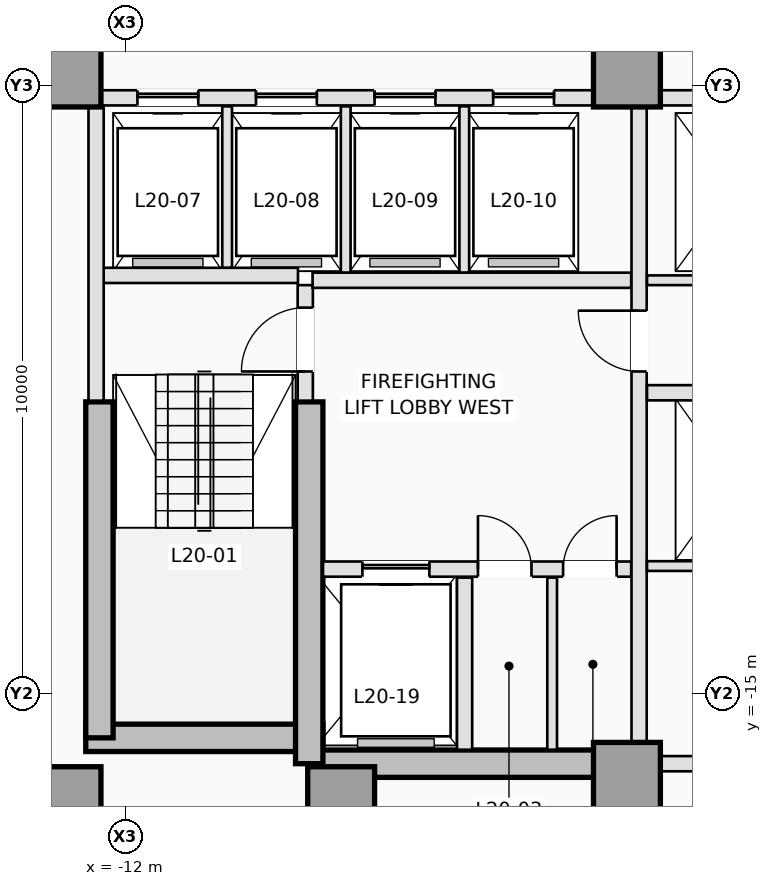
"""IFC4 building model, lengths in metres.
Left out: names, types, materials, properties, quantities, classifications, styles, units other than length and angle.
Written with IfcOpenShell. Run it as: python <this file> out.ifc"""

import sys

from ifc_helpers import new_model, si_unit, direction, frame, frame_2d, origin, origin_2d, place, context, subcontext, project, spatial, rectangle, extrude, element, fill, save


model = new_model("IFC4")
c1 = context("Model", 3, precision=1e-05, world=origin(), true_north=direction((0.0, 1.0)))
c2 = subcontext(c1, "Body", "Model", "MODEL_VIEW")
j1 = project(units=[si_unit("LENGTHUNIT", "METRE"), si_unit("PLANEANGLEUNIT", "RADIAN")], contexts=[c1])
p1 = place(None, origin())
s1 = spatial("IfcSite", under=j1, at=p1, CompositionType="ELEMENT")
p2 = place(p1, origin())
s2 = spatial("IfcBuilding", under=s1, at=p2, CompositionType="ELEMENT")
p3 = place(p2, frame((0.0, 0.0, 76.6)))
s3 = spatial("IfcBuildingStorey", under=s2, at=p3, CompositionType="ELEMENT", Elevation=76.6)
p4 = place(p3, frame((-12.65, -15.725, 0.0), z_axis=(0.0, 0.0, 1.0), x_axis=(1.0, 0.0, 0.0)))
e1 = element("IfcWall", 1, at=p4, inside=s3, PredefinedType="SHEAR", context=c2, shape_type="SweptSolid", body=[
    extrude(rectangle(XDim=3.9, YDim=0.45, at=frame_2d((1.95, 0.0))), origin(), (0.0, 0.0, 1.0), 3.5),
])
p5 = place(p3, frame((-8.975, -16.15, 0.0), z_axis=(0.0, 0.0, 1.0), x_axis=(1.0, 0.0, 0.0)))
e2 = element("IfcWall", 2, at=p5, inside=s3, PredefinedType="SHEAR", context=c2, shape_type="SweptSolid", body=[
    extrude(rectangle(XDim=5.225, YDim=0.45, at=frame_2d((2.613, 0.0))), origin(), (0.0, 0.0, 1.0), 3.5),
])
p6 = place(p3, frame((-12.425, -15.725, 0.0), z_axis=(0.0, 0.0, 1.0), x_axis=(0.0, 1.0, 0.0)))
e3 = element("IfcWall", 3, at=p6, inside=s3, PredefinedType="SHEAR", context=c2, shape_type="SweptSolid", body=[
    extrude(rectangle(XDim=5.525, YDim=0.45, at=frame_2d((2.763, 0.0))), origin(), (0.0, 0.0, 1.0), 3.5),
])
p7 = place(p3, frame((-8.975, -16.15, 0.0), z_axis=(0.0, 0.0, 1.0), x_axis=(0.0, 1.0, 0.0)))
e4 = element("IfcWall", 4, at=p7, inside=s3, PredefinedType="SHEAR", context=c2, shape_type="SweptSolid", body=[
    extrude(rectangle(XDim=5.95, YDim=0.45, at=frame_2d((2.975, 0.0))), origin(), (0.0, 0.0, 1.0), 3.5),
])
for number, where, z_axis, x_axis in (
    (5, (-12.95, -16.75, 0.0), (0.0, 0.0, 1.0), (1.0, 0.0, 0.0)),
    (6, (-8.45, -16.75, 0.0), (0.0, 0.0, 1.0), (1.0, 0.0, 0.0)),
    (7, (-3.75, -16.35, 0.0), (0.0, 0.0, 1.0), (1.0, 0.0, 0.0)),
    (8, (-12.95, -4.8, 0.0), (0.0, 0.0, 1.0), (1.0, 0.0, 0.0)),
    (9, (-3.75, -4.8, 0.0), (0.0, 0.0, 1.0), (1.0, 0.0, 0.0)),
):
    element("IfcColumn", number, at=place(p3, frame(where, z_axis=z_axis, x_axis=x_axis)), inside=s3, PredefinedType="COLUMN", context=c2, shape_type="SweptSolid", body=[
        extrude(rectangle(XDim=1.1, YDim=1.1, at=origin_2d()), origin(), (0.0, 0.0, 1.0), 3.5),
    ])
p8 = place(p3, frame((-9.04, -10.18, 0.0), z_axis=(0.0, 0.0, 1.0), x_axis=(0.0, 1.0, 0.0)))
e10 = element("IfcWall", 10, at=p8, inside=s3, PredefinedType="PARTITIONING", context=c2, shape_type="SweptSolid", body=[
    extrude(rectangle(XDim=1.9, YDim=0.25, at=frame_2d((0.95, 0.0))), origin(), (0.0, 0.0, 1.0), 3.25),
])
p9 = place(p8, frame((0.48, 0.0, 0.0)))
e11 = element("IfcOpeningElement", 11, at=p9, cuts=e10, PredefinedType="OPENING", context=c2, shape_type="SweptSolid", body=[
    extrude(rectangle(XDim=1.05, YDim=2.15, at=frame_2d((0.525, 1.075))), frame((0.0, 0.135, 0.0), z_axis=(0.0, -1.0, 0.0), x_axis=(1.0, 0.0, 0.0)), (0.0, 0.0, 1.0), 0.27),
])
p10 = place(p3, frame((-12.38, -8.12, 0.0), z_axis=(0.0, 0.0, 1.0), x_axis=(1.0, 0.0, 0.0)))
e12 = element("IfcWall", 12, at=p10, inside=s3, PredefinedType="PARTITIONING", context=c2, shape_type="SweptSolid", body=[
    extrude(rectangle(XDim=3.22, YDim=0.25, at=frame_2d((1.61, 0.0))), origin(), (0.0, 0.0, 1.0), 3.25),
])
p11 = place(p3, frame((-12.48, -10.18, 0.0), z_axis=(0.0, 0.0, 1.0), x_axis=(0.0, 1.0, 0.0)))
e13 = element("IfcWall", 13, at=p11, inside=s3, PredefinedType="PARTITIONING", context=c2, shape_type="SweptSolid", body=[
    extrude(rectangle(XDim=4.828, YDim=0.25, at=frame_2d((2.414, 0.0))), origin(), (0.0, 0.0, 1.0), 3.25),
])
p12 = place(p3, frame((-8.748, -12.95, 0.0), z_axis=(0.0, 0.0, 1.0), x_axis=(1.0, 0.0, 0.0)))
e14 = element("IfcWall", 14, at=p12, inside=s3, PredefinedType="PARTITIONING", context=c2, shape_type="SweptSolid", body=[
    extrude(rectangle(XDim=5.068, YDim=0.25, at=frame_2d((2.534, 0.0))), origin(), (0.0, 0.0, 1.0), 3.25),
])
p13 = place(p12, frame((0.648, 0.0, 0.0)))
e15 = element("IfcOpeningElement", 15, at=p13, cuts=e14, PredefinedType="OPENING", context=c2, shape_type="SweptSolid", body=[
    extrude(rectangle(XDim=1.1, YDim=2.15, at=frame_2d((0.55, 1.075))), frame((0.0, 0.135, 0.0), z_axis=(0.0, -1.0, 0.0), x_axis=(1.0, 0.0, 0.0)), (0.0, 0.0, 1.0), 0.27),
])
p14 = place(p12, frame((2.548, 0.0, 0.0)))
e16 = element("IfcOpeningElement", 16, at=p14, cuts=e14, PredefinedType="OPENING", context=c2, shape_type="SweptSolid", body=[
    extrude(rectangle(XDim=0.88, YDim=2.1, at=frame_2d((0.44, 1.05))), frame((0.0, 0.135, 0.0), z_axis=(0.0, -1.0, 0.0), x_axis=(1.0, 0.0, 0.0)), (0.0, 0.0, 1.0), 0.27),
])
p15 = place(p12, frame((3.948, 0.0, 0.0)))
e17 = element("IfcOpeningElement", 17, at=p15, cuts=e14, PredefinedType="OPENING", context=c2, shape_type="SweptSolid", body=[
    extrude(rectangle(XDim=0.88, YDim=2.1, at=frame_2d((0.44, 1.05))), frame((0.0, 0.135, 0.0), z_axis=(0.0, -1.0, 0.0), x_axis=(1.0, 0.0, 0.0)), (0.0, 0.0, 1.0), 0.27),
])
p16 = place(p3, frame((-6.42, -15.92, 0.0), z_axis=(0.0, 0.0, 1.0), x_axis=(0.0, 1.0, 0.0)))
e18 = element("IfcWall", 18, at=p16, inside=s3, PredefinedType="PARTITIONING", context=c2, shape_type="SweptSolid", body=[
    extrude(rectangle(XDim=2.83, YDim=0.25, at=frame_2d((1.415, 0.0))), origin(), (0.0, 0.0, 1.0), 3.25),
])
p17 = place(p3, frame((-4.98, -15.92, 0.0), z_axis=(0.0, 0.0, 1.0), x_axis=(0.0, 1.0, 0.0)))
e19 = element("IfcWall", 19, at=p17, inside=s3, PredefinedType="PARTITIONING", context=c2, shape_type="SweptSolid", body=[
    extrude(rectangle(XDim=2.83, YDim=0.16, at=frame_2d((1.415, 0.0))), origin(), (0.0, 0.0, 1.0), 3.25),
])
p18 = place(p3, frame((-8.92, -8.2, 0.0), z_axis=(0.0, 0.0, 1.0), x_axis=(1.0, 0.0, 0.0)))
e20 = element("IfcWall", 20, at=p18, inside=s3, PredefinedType="PARTITIONING", context=c2, shape_type="SweptSolid", body=[
    extrude(rectangle(XDim=5.24, YDim=0.25, at=frame_2d((2.62, 0.0))), origin(), (0.0, 0.0, 1.0), 3.25),
])
p19 = place(p3, frame((-3.55, -15.798, 0.0), z_axis=(0.0, 0.0, 1.0), x_axis=(0.0, 1.0, 0.0)))
e21 = element("IfcWall", 21, at=p19, inside=s3, PredefinedType="PARTITIONING", context=c2, shape_type="SweptSolid", body=[
    extrude(rectangle(XDim=10.446, YDim=0.25, at=frame_2d((5.223, 0.0))), origin(), (0.0, 0.0, 1.0), 3.25),
])
p20 = place(p19, frame((6.098, 0.0, 0.0)))
e22 = element("IfcOpeningElement", 22, at=p20, cuts=e21, PredefinedType="OPENING", context=c2, shape_type="SweptSolid", body=[
    extrude(rectangle(XDim=1.0, YDim=2.15, at=frame_2d((0.5, 1.075))), frame((0.0, 0.135, 0.0), z_axis=(0.0, -1.0, 0.0), x_axis=(1.0, 0.0, 0.0)), (0.0, 0.0, 1.0), 0.27),
])
p21 = place(p3, frame((-12.398, -5.2, 0.0), z_axis=(0.0, 0.0, 1.0), x_axis=(1.0, 0.0, 0.0)))
e23 = element("IfcWall", 23, at=p21, inside=s3, PredefinedType="PARTITIONING", context=c2, shape_type="SweptSolid", body=[
    extrude(rectangle(XDim=8.096, YDim=0.25, at=frame_2d((4.048, 0.0))), origin(), (0.0, 0.0, 1.0), 3.25),
])
p22 = place(p21, frame((0.598, 0.0, 0.0)))
e24 = element("IfcOpeningElement", 24, at=p22, cuts=e23, PredefinedType="OPENING", context=c2, shape_type="SweptSolid", body=[
    extrude(rectangle(XDim=1.0, YDim=2.15, at=frame_2d((0.5, 1.075))), frame((0.0, 0.135, 0.0), z_axis=(0.0, -1.0, 0.0), x_axis=(1.0, 0.0, 0.0)), (0.0, 0.0, 1.0), 0.27),
])
p23 = place(p21, frame((2.548, 0.0, 0.0)))
e25 = element("IfcOpeningElement", 25, at=p23, cuts=e23, PredefinedType="OPENING", context=c2, shape_type="SweptSolid", body=[
    extrude(rectangle(XDim=1.0, YDim=2.15, at=frame_2d((0.5, 1.075))), frame((0.0, 0.135, 0.0), z_axis=(0.0, -1.0, 0.0), x_axis=(1.0, 0.0, 0.0)), (0.0, 0.0, 1.0), 0.27),
])
p24 = place(p21, frame((4.498, 0.0, 0.0)))
e26 = element("IfcOpeningElement", 26, at=p24, cuts=e23, PredefinedType="OPENING", context=c2, shape_type="SweptSolid", body=[
    extrude(rectangle(XDim=1.0, YDim=2.15, at=frame_2d((0.5, 1.075))), frame((0.0, 0.135, 0.0), z_axis=(0.0, -1.0, 0.0), x_axis=(1.0, 0.0, 0.0)), (0.0, 0.0, 1.0), 0.27),
])
p25 = place(p21, frame((6.448, 0.0, 0.0)))
e27 = element("IfcOpeningElement", 27, at=p25, cuts=e23, PredefinedType="OPENING", context=c2, shape_type="SweptSolid", body=[
    extrude(rectangle(XDim=1.0, YDim=2.15, at=frame_2d((0.5, 1.075))), frame((0.0, 0.135, 0.0), z_axis=(0.0, -1.0, 0.0), x_axis=(1.0, 0.0, 0.0)), (0.0, 0.0, 1.0), 0.27),
])
p26 = place(p3, frame((-3.198, -5.2, 0.0), z_axis=(0.0, 0.0, 1.0), x_axis=(1.0, 0.0, 0.0)))
e28 = element("IfcWall", 28, at=p26, inside=s3, PredefinedType="PARTITIONING", context=c2, shape_type="SweptSolid", body=[
    extrude(rectangle(XDim=2.248, YDim=0.25, at=frame_2d((1.124, 0.0))), origin(), (0.0, 0.0, 1.0), 3.25),
])
p27 = place(p3, frame((-10.325, -7.993, 0.0), z_axis=(0.0, 0.0, 1.0), x_axis=(0.0, 1.0, 0.0)))
e29 = element("IfcWall", 29, at=p27, inside=s3, PredefinedType="PARTITIONING", context=c2, shape_type="SweptSolid", body=[
    extrude(rectangle(XDim=2.653, YDim=0.16, at=frame_2d((1.326, 0.0))), origin(), (0.0, 0.0, 1.0), 3.25),
])
for number, where, z_axis, x_axis in (
    (30, (-8.375, -8.073, 0.0), (0.0, 0.0, 1.0), (0.0, 1.0, 0.0)),
    (31, (-6.425, -8.073, 0.0), (0.0, 0.0, 1.0), (0.0, 1.0, 0.0)),
):
    element("IfcWall", number, at=place(p3, frame(where, z_axis=z_axis, x_axis=x_axis)), inside=s3, PredefinedType="PARTITIONING", context=c2, shape_type="SweptSolid", body=[
        extrude(rectangle(XDim=2.733, YDim=0.16, at=frame_2d((1.366, 0.0))), origin(), (0.0, 0.0, 1.0), 3.25),
    ])
p28 = place(p3, frame((-3.198, -16.15, 0.0), z_axis=(0.0, 0.0, 1.0), x_axis=(1.0, 0.0, 0.0)))
e32 = element("IfcWall", 32, at=p28, inside=s3, PredefinedType="PARTITIONING", context=c2, shape_type="SweptSolid", body=[
    extrude(rectangle(XDim=6.396, YDim=0.25, at=frame_2d((3.198, 0.0))), origin(), (0.0, 0.0, 1.0), 2.3),
])
p29 = place(p3, frame((-3.42, -8.2, 0.0), z_axis=(0.0, 0.0, 1.0), x_axis=(1.0, 0.0, 0.0)))
e33 = element("IfcWall", 33, at=p29, inside=s3, PredefinedType="PARTITIONING", context=c2, shape_type="SweptSolid", body=[
    extrude(rectangle(XDim=2.47, YDim=0.16, at=frame_2d((1.235, 0.0))), origin(), (0.0, 0.0, 1.0), 3.25),
])
p30 = place(p3, frame((-3.42, -10.05, 0.0), z_axis=(0.0, 0.0, 1.0), x_axis=(1.0, 0.0, 0.0)))
e34 = element("IfcWall", 34, at=p30, inside=s3, PredefinedType="PARTITIONING", context=c2, shape_type="SweptSolid", body=[
    extrude(rectangle(XDim=2.47, YDim=0.25, at=frame_2d((1.235, 0.0))), origin(), (0.0, 0.0, 1.0), 3.25),
])
p31 = place(p3, frame((-3.42, -12.9, 0.0), z_axis=(0.0, 0.0, 1.0), x_axis=(1.0, 0.0, 0.0)))
e35 = element("IfcWall", 35, at=p31, inside=s3, PredefinedType="PARTITIONING", context=c2, shape_type="SweptSolid", body=[
    extrude(rectangle(XDim=6.84, YDim=0.16, at=frame_2d((3.42, 0.0))), origin(), (0.0, 0.0, 1.0), 3.25),
])
p32 = place(p31, frame((2.98, 0.0, 0.0)))
e36 = element("IfcOpeningElement", 36, at=p32, cuts=e35, PredefinedType="OPENING", context=c2, shape_type="SweptSolid", body=[
    extrude(rectangle(XDim=0.88, YDim=2.12, at=frame_2d((0.44, 1.06))), frame((0.0, 0.09, 0.0), z_axis=(0.0, -1.0, 0.0), x_axis=(1.0, 0.0, 0.0)), (0.0, 0.0, 1.0), 0.18),
])
p33 = place(p22, origin())
e37 = element("IfcDoor", 37, at=p33, inside=s3, OperationType="SLIDING_TO_LEFT", PredefinedType="DOOR", context=c2, shape_type="SweptSolid", body=[
    extrude(rectangle(XDim=1.0, YDim=2.15, at=frame_2d((0.5, 1.075))), frame((0.0, 0.025, 0.0), z_axis=(0.0, -1.0, 0.0), x_axis=(1.0, 0.0, 0.0)), (0.0, 0.0, 1.0), 0.05),
])
fill(e24, e37)
p34 = place(p23, origin())
e38 = element("IfcDoor", 38, at=p34, inside=s3, OperationType="SLIDING_TO_LEFT", PredefinedType="DOOR", context=c2, shape_type="SweptSolid", body=[
    extrude(rectangle(XDim=1.0, YDim=2.15, at=frame_2d((0.5, 1.075))), frame((0.0, 0.025, 0.0), z_axis=(0.0, -1.0, 0.0), x_axis=(1.0, 0.0, 0.0)), (0.0, 0.0, 1.0), 0.05),
])
fill(e25, e38)
p35 = place(p24, origin())
e39 = element("IfcDoor", 39, at=p35, inside=s3, OperationType="SLIDING_TO_LEFT", PredefinedType="DOOR", context=c2, shape_type="SweptSolid", body=[
    extrude(rectangle(XDim=1.0, YDim=2.15, at=frame_2d((0.5, 1.075))), frame((0.0, 0.025, 0.0), z_axis=(0.0, -1.0, 0.0), x_axis=(1.0, 0.0, 0.0)), (0.0, 0.0, 1.0), 0.05),
])
fill(e26, e39)
p36 = place(p25, origin())
e40 = element("IfcDoor", 40, at=p36, inside=s3, OperationType="SLIDING_TO_LEFT", PredefinedType="DOOR", context=c2, shape_type="SweptSolid", body=[
    extrude(rectangle(XDim=1.0, YDim=2.15, at=frame_2d((0.5, 1.075))), frame((0.0, 0.025, 0.0), z_axis=(0.0, -1.0, 0.0), x_axis=(1.0, 0.0, 0.0)), (0.0, 0.0, 1.0), 0.05),
])
fill(e27, e40)
p37 = place(p13, origin())
e41 = element("IfcDoor", 41, at=p37, inside=s3, OperationType="SLIDING_TO_LEFT", PredefinedType="DOOR", context=c2, shape_type="SweptSolid", body=[
    extrude(rectangle(XDim=1.1, YDim=2.15, at=frame_2d((0.55, 1.075))), frame((0.0, 0.025, 0.0), z_axis=(0.0, -1.0, 0.0), x_axis=(1.0, 0.0, 0.0)), (0.0, 0.0, 1.0), 0.05),
])
fill(e15, e41)
p38 = place(p9, origin())
e42 = element("IfcDoor", 42, at=p38, inside=s3, OperationType="SINGLE_SWING_LEFT", PredefinedType="DOOR", context=c2, shape_type="SweptSolid", body=[
    extrude(rectangle(XDim=1.05, YDim=2.15, at=frame_2d((0.525, 1.075))), frame((0.0, 0.025, 0.0), z_axis=(0.0, -1.0, 0.0), x_axis=(1.0, 0.0, 0.0)), (0.0, 0.0, 1.0), 0.05),
])
fill(e11, e42)
p39 = place(p14, origin())
e43 = element("IfcDoor", 43, at=p39, inside=s3, OperationType="SINGLE_SWING_LEFT", PredefinedType="TRAPDOOR", context=c2, shape_type="SweptSolid", body=[
    extrude(rectangle(XDim=0.88, YDim=2.1, at=frame_2d((0.44, 1.05))), frame((0.0, 0.025, 0.0), z_axis=(0.0, -1.0, 0.0), x_axis=(1.0, 0.0, 0.0)), (0.0, 0.0, 1.0), 0.05),
])
fill(e16, e43)
p40 = place(p15, origin())
e44 = element("IfcDoor", 44, at=p40, inside=s3, OperationType="SINGLE_SWING_RIGHT", PredefinedType="TRAPDOOR", context=c2, shape_type="SweptSolid", body=[
    extrude(rectangle(XDim=0.88, YDim=2.1, at=frame_2d((0.44, 1.05))), frame((0.0, 0.025, 0.0), z_axis=(0.0, -1.0, 0.0), x_axis=(1.0, 0.0, 0.0)), (0.0, 0.0, 1.0), 0.05),
])
fill(e17, e44)
p41 = place(p20, origin())
e45 = element("IfcDoor", 45, at=p41, inside=s3, OperationType="SINGLE_SWING_RIGHT", PredefinedType="DOOR", context=c2, shape_type="SweptSolid", body=[
    extrude(rectangle(XDim=1.0, YDim=2.15, at=frame_2d((0.5, 1.075))), frame((0.0, 0.025, 0.0), z_axis=(0.0, -1.0, 0.0), x_axis=(1.0, 0.0, 0.0)), (0.0, 0.0, 1.0), 0.05),
])
fill(e22, e45)
save(model, sys.argv[1])
